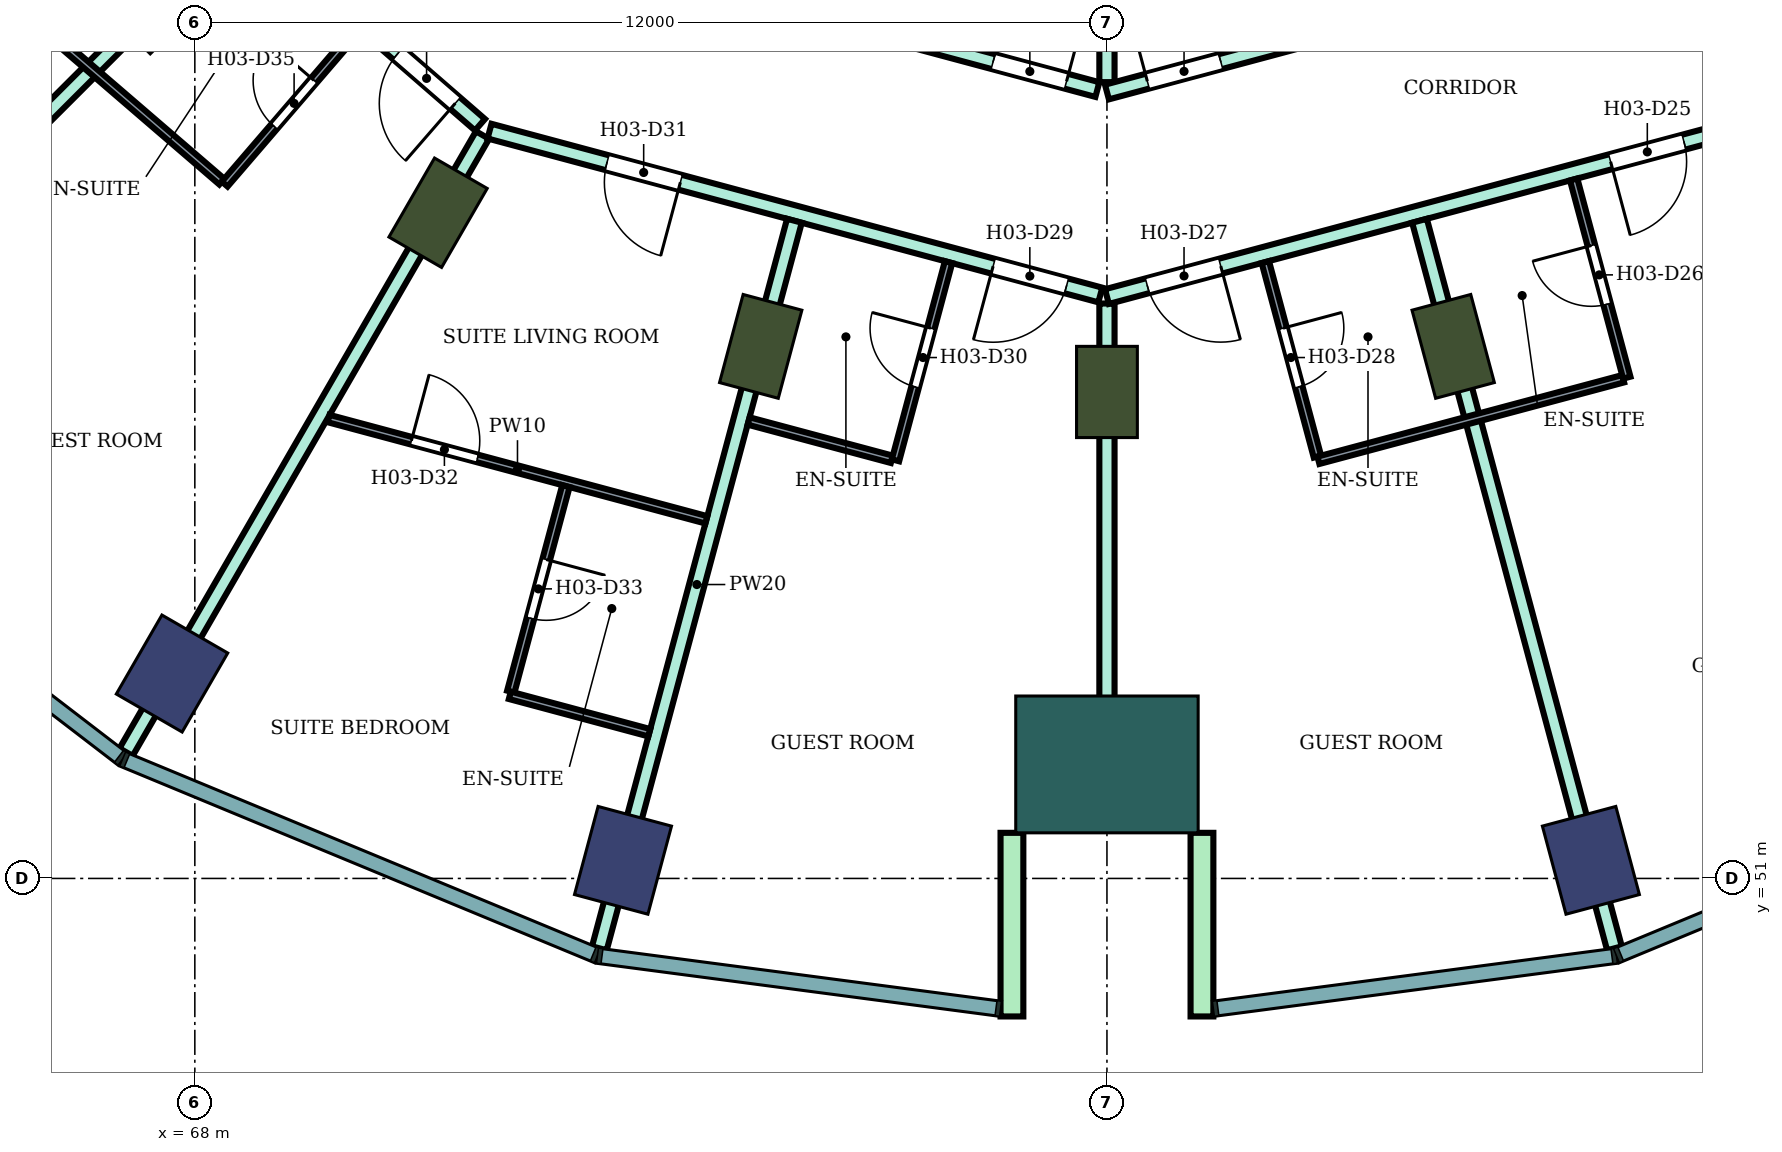
"""IFC4 building model, lengths in metres.
Left out: names, types, materials, properties, quantities, classifications, styles, units other than length and angle.
Written with IfcOpenShell. Run it as: python <this file> out.ifc"""

import sys

from ifc_helpers import new_model, si_unit, direction, frame, frame_2d, origin, origin_2d, place, context, subcontext, project, spatial, rectangle, extrude, element, fill, save


model = new_model("IFC4")
c1 = context("Model", 3, precision=1e-05, world=origin(), true_north=direction((0.0, 1.0)))
c2 = subcontext(c1, "Body", "Model", "MODEL_VIEW")
j1 = project(units=[si_unit("LENGTHUNIT", "METRE"), si_unit("PLANEANGLEUNIT", "RADIAN")], contexts=[c1])
p1 = place(None, origin())
s1 = spatial("IfcSite", under=j1, at=p1, CompositionType="ELEMENT")
p2 = place(p1, origin())
s2 = spatial("IfcBuilding", under=s1, at=p2, CompositionType="ELEMENT")
p3 = place(p2, frame((0.0, 0.0, 55.4)))
s3 = spatial("IfcBuildingStorey", under=s2, at=p3, CompositionType="ELEMENT", Elevation=55.4)
for number, where, z_axis, x_axis in (
    (1, (67.7, 53.696, 0.0), (0.0, 0.0, 1.0), (-0.5, -0.866, 0.0)),
    (2, (73.633, 51.238, 0.0), (0.0, 0.0, 1.0), (-0.259, -0.966, 0.0)),
    (3, (86.367, 51.238, 0.0), (0.0, 0.0, 1.0), (0.259, -0.966, 0.0)),
):
    element("IfcColumn", number, at=place(p3, frame(where, z_axis=z_axis, x_axis=x_axis)), inside=s3, PredefinedType="COLUMN", context=c2, shape_type="SweptSolid", body=[
        extrude(rectangle(XDim=1.2, YDim=1.0, at=origin_2d()), origin(), (0.0, 0.0, 1.0), 3.8),
    ])
for number, where, z_axis, x_axis in (
    (4, (67.555, 62.555, 0.0), (0.0, 0.0, 1.0), (-0.707, -0.707, 0.0)),
    (5, (71.2, 59.758, 0.0), (0.0, 0.0, 1.0), (-0.5, -0.866, 0.0)),
    (6, (75.445, 58.0, 0.0), (0.0, 0.0, 1.0), (-0.259, -0.966, 0.0)),
    (7, (80.0, 57.4, 0.0), (0.0, 0.0, 1.0), (0.0, -1.0, 0.0)),
    (8, (84.555, 58.0, 0.0), (0.0, 0.0, 1.0), (0.259, -0.966, 0.0)),
):
    element("IfcColumn", number, at=place(p3, frame(where, z_axis=z_axis, x_axis=x_axis)), inside=s3, PredefinedType="COLUMN", context=c2, shape_type="SweptSolid", body=[
        extrude(rectangle(XDim=1.2, YDim=0.8, at=origin_2d()), origin(), (0.0, 0.0, 1.0), 3.8),
    ])
p4 = place(p3, frame((80.0, 52.5, 0.0), z_axis=(0.0, 0.0, 1.0), x_axis=(0.0, -1.0, 0.0)))
e9 = element("IfcColumn", 9, at=p4, inside=s3, PredefinedType="COLUMN", context=c2, shape_type="SweptSolid", body=[
    extrude(rectangle(XDim=1.8, YDim=2.4, at=origin_2d()), origin(), (0.0, 0.0, 1.0), 3.8),
])
for number, where, z_axis, x_axis in (
    (10, (78.75, 51.6, 0.0), (0.0, 0.0, 1.0), (0.0, -1.0, 0.0)),
    (11, (81.25, 51.6, 0.0), (0.0, 0.0, 1.0), (0.0, -1.0, 0.0)),
):
    element("IfcWall", number, at=place(p3, frame(where, z_axis=z_axis, x_axis=x_axis)), inside=s3, PredefinedType="NOTDEFINED", context=c2, shape_type="SweptSolid", body=[
        extrude(rectangle(XDim=2.416, YDim=0.3, at=frame_2d((1.208, 0.0))), origin(), (0.0, 0.0, 1.0), 3.8),
    ])
p5 = place(p3, frame((63.596, 58.596, 0.0), z_axis=(0.0, 0.0, 1.0), x_axis=(0.707106781187, 0.707106781187, 0.0)))
e12 = element("IfcWall", 12, at=p5, inside=s3, PredefinedType="PARTITIONING", context=c2, shape_type="SweptSolid", body=[
    extrude(rectangle(XDim=7.005, YDim=0.2, at=frame_2d((3.503, 0.0))), origin(), (0.0, 0.0, 1.0), 3.35),
])
p6 = place(p3, frame((67.081, 64.971, 0.0), z_axis=(0.0, 0.0, 1.0), x_axis=(0.755031061605, -0.65568902386, 0.0)))
e13 = element("IfcWall", 13, at=p6, inside=s3, PredefinedType="PARTITIONING", context=c2, shape_type="SweptSolid", body=[
    extrude(rectangle(XDim=6.186, YDim=0.2, at=frame_2d((3.093, 0.0))), origin(), (0.0, 0.0, 1.0), 3.35),
])
p7 = place(p6, frame((4.755, 0.0, 0.0)))
e14 = element("IfcOpeningElement", 14, at=p7, cuts=e13, PredefinedType="OPENING", context=c2, shape_type="SweptSolid", body=[
    extrude(rectangle(XDim=1.0, YDim=2.1, at=frame_2d((0.5, 1.05))), frame((0.0, 0.11, 0.0), z_axis=(0.0, -1.0, 0.0), x_axis=(1.0, 0.0, 0.0)), (0.0, 0.0, 1.0), 0.22),
])
p8 = place(p3, frame((67.095, 52.662, 0.0), z_axis=(0.0, 0.0, 1.0), x_axis=(0.500247659952, 0.865882370021, 0.0)))
e15 = element("IfcWall", 15, at=p8, inside=s3, PredefinedType="PARTITIONING", context=c2, shape_type="SweptSolid", body=[
    extrude(rectangle(XDim=9.375, YDim=0.2, at=frame_2d((4.688, 0.0))), origin(), (0.0, 0.0, 1.0), 3.35),
])
p9 = place(p3, frame((71.877, 60.831, 0.0), z_axis=(0.0, 0.0, 1.0), x_axis=(0.965852509869, -0.259092510851, 0.0)))
e16 = element("IfcWall", 16, at=p9, inside=s3, PredefinedType="PARTITIONING", context=c2, shape_type="SweptSolid", body=[
    extrude(rectangle(XDim=8.32, YDim=0.2, at=frame_2d((4.16, 0.0))), origin(), (0.0, 0.0, 1.0), 3.35),
])
p10 = place(p9, frame((6.86, 0.0, 0.0)))
e17 = element("IfcOpeningElement", 17, at=p10, cuts=e16, PredefinedType="OPENING", context=c2, shape_type="SweptSolid", body=[
    extrude(rectangle(XDim=1.0, YDim=2.1, at=frame_2d((0.5, 1.05))), frame((0.0, 0.11, 0.0), z_axis=(0.0, -1.0, 0.0), x_axis=(1.0, 0.0, 0.0)), (0.0, 0.0, 1.0), 0.22),
])
p11 = place(p9, frame((1.6, 0.0, 0.0)))
e18 = element("IfcOpeningElement", 18, at=p11, cuts=e16, PredefinedType="OPENING", context=c2, shape_type="SweptSolid", body=[
    extrude(rectangle(XDim=1.0, YDim=2.1, at=frame_2d((0.5, 1.05))), frame((0.0, 0.11, 0.0), z_axis=(0.0, -1.0, 0.0), x_axis=(1.0, 0.0, 0.0)), (0.0, 0.0, 1.0), 0.22),
])
p12 = place(p3, frame((73.297, 63.143, 0.0), z_axis=(0.0, 0.0, 1.0), x_axis=(0.965859030528, -0.25906820173, 0.0)))
e19 = element("IfcWall", 19, at=p12, inside=s3, PredefinedType="PARTITIONING", context=c2, shape_type="SweptSolid", body=[
    extrude(rectangle(XDim=6.81, YDim=0.2, at=frame_2d((3.405, 0.0))), origin(), (0.0, 0.0, 1.0), 3.35),
])
p13 = place(p12, frame((5.39, 0.0, 0.0)))
e20 = element("IfcOpeningElement", 20, at=p13, cuts=e19, PredefinedType="OPENING", context=c2, shape_type="SweptSolid", body=[
    extrude(rectangle(XDim=1.0, YDim=2.1, at=frame_2d((0.5, 1.05))), frame((0.0, 0.11, 0.0), z_axis=(0.0, -1.0, 0.0), x_axis=(1.0, 0.0, 0.0)), (0.0, 0.0, 1.0), 0.22),
])
p14 = place(p3, frame((73.322, 50.081, 0.0), z_axis=(0.0, 0.0, 1.0), x_axis=(0.25896431718, 0.965886889044, 0.0)))
e21 = element("IfcWall", 21, at=p14, inside=s3, PredefinedType="PARTITIONING", context=c2, shape_type="SweptSolid", body=[
    extrude(rectangle(XDim=9.909, YDim=0.2, at=frame_2d((4.955, 0.0))), origin(), (0.0, 0.0, 1.0), 3.35),
])
p15 = place(p3, frame((80.0, 51.8, 0.0), z_axis=(0.0, 0.0, 1.0), x_axis=(0.0, 1.0, 0.0)))
e22 = element("IfcWall", 22, at=p15, inside=s3, PredefinedType="PARTITIONING", context=c2, shape_type="SweptSolid", body=[
    extrude(rectangle(XDim=6.764, YDim=0.2, at=frame_2d((3.382, 0.0))), origin(), (0.0, 0.0, 1.0), 3.35),
])
p16 = place(p3, frame((80.0, 58.655, 0.0), z_axis=(0.0, 0.0, 1.0), x_axis=(0.965974635626, 0.258636817424, 0.0)))
e23 = element("IfcWall", 23, at=p16, inside=s3, PredefinedType="PARTITIONING", context=c2, shape_type="SweptSolid", body=[
    extrude(rectangle(XDim=8.36, YDim=0.2, at=frame_2d((4.18, 0.0))), origin(), (0.0, 0.0, 1.0), 3.35),
])
p17 = place(p16, frame((6.86, 0.0, 0.0)))
e24 = element("IfcOpeningElement", 24, at=p17, cuts=e23, PredefinedType="OPENING", context=c2, shape_type="SweptSolid", body=[
    extrude(rectangle(XDim=1.0, YDim=2.1, at=frame_2d((0.5, 1.05))), frame((0.0, 0.11, 0.0), z_axis=(0.0, -1.0, 0.0), x_axis=(1.0, 0.0, 0.0)), (0.0, 0.0, 1.0), 0.22),
])
p18 = place(p16, frame((0.55, 0.0, 0.0)))
e25 = element("IfcOpeningElement", 25, at=p18, cuts=e23, PredefinedType="OPENING", context=c2, shape_type="SweptSolid", body=[
    extrude(rectangle(XDim=1.0, YDim=2.1, at=frame_2d((0.5, 1.05))), frame((0.0, 0.11, 0.0), z_axis=(0.0, -1.0, 0.0), x_axis=(1.0, 0.0, 0.0)), (0.0, 0.0, 1.0), 0.22),
])
p19 = place(p3, frame((80.0, 61.476, 0.0), z_axis=(0.0, 0.0, 1.0), x_axis=(0.0, 1.0, 0.0)))
e26 = element("IfcWall", 26, at=p19, inside=s3, PredefinedType="PARTITIONING", context=c2, shape_type="SweptSolid", body=[
    extrude(rectangle(XDim=5.825, YDim=0.2, at=frame_2d((2.913, 0.0))), origin(), (0.0, 0.0, 1.0), 3.35),
])
p20 = place(p3, frame((80.0, 61.346, 0.0), z_axis=(0.0, 0.0, 1.0), x_axis=(0.965924181808, 0.258825182312, 0.0)))
e27 = element("IfcWall", 27, at=p20, inside=s3, PredefinedType="PARTITIONING", context=c2, shape_type="SweptSolid", body=[
    extrude(rectangle(XDim=6.94, YDim=0.2, at=frame_2d((3.47, 0.0))), origin(), (0.0, 0.0, 1.0), 3.35),
])
p21 = place(p20, frame((0.55, 0.0, 0.0)))
e28 = element("IfcOpeningElement", 28, at=p21, cuts=e27, PredefinedType="OPENING", context=c2, shape_type="SweptSolid", body=[
    extrude(rectangle(XDim=1.0, YDim=2.1, at=frame_2d((0.5, 1.05))), frame((0.0, 0.11, 0.0), z_axis=(0.0, -1.0, 0.0), x_axis=(1.0, 0.0, 0.0)), (0.0, 0.0, 1.0), 0.22),
])
p22 = place(p3, frame((84.112, 59.652, 0.0), z_axis=(0.0, 0.0, 1.0), x_axis=(0.258843225553, -0.965919346832, 0.0)))
e29 = element("IfcWall", 29, at=p22, inside=s3, PredefinedType="PARTITIONING", context=c2, shape_type="SweptSolid", body=[
    extrude(rectangle(XDim=9.909, YDim=0.2, at=frame_2d((4.955, 0.0))), origin(), (0.0, 0.0, 1.0), 3.35),
])
p23 = place(p3, frame((65.209, 62.875, 0.0), z_axis=(0.0, 0.0, 1.0), x_axis=(0.757930378138, -0.652335451969, 0.0)))
e30 = element("IfcWall", 30, at=p23, inside=s3, PredefinedType="PARTITIONING", context=c2, shape_type="SweptSolid", body=[
    extrude(rectangle(XDim=4.15, YDim=0.1, at=frame_2d((2.075, 0.0))), origin(), (0.0, 0.0, 1.0), 3.35),
])
p24 = place(p3, frame((68.393, 60.135, 0.0), z_axis=(0.0, 0.0, 1.0), x_axis=(0.652061182569, 0.758166349944, 0.0)))
e31 = element("IfcWall", 31, at=p24, inside=s3, PredefinedType="PARTITIONING", context=c2, shape_type="SweptSolid", body=[
    extrude(rectangle(XDim=2.69, YDim=0.1, at=frame_2d((1.345, 0.0))), origin(), (0.0, 0.0, 1.0), 3.35),
])
p25 = place(p24, frame((1.0, 0.0, 0.0)))
e32 = element("IfcOpeningElement", 32, at=p25, cuts=e31, PredefinedType="OPENING", context=c2, shape_type="SweptSolid", body=[
    extrude(rectangle(XDim=0.8, YDim=2.1, at=frame_2d((0.4, 1.05))), frame((0.0, 0.06, 0.0), z_axis=(0.0, -1.0, 0.0), x_axis=(1.0, 0.0, 0.0)), (0.0, 0.0, 1.0), 0.12),
])
p26 = place(p3, frame((69.76, 57.051, 0.0), z_axis=(0.0, 0.0, 1.0), x_axis=(0.965880475586, -0.258988236958, 0.0)))
e33 = element("IfcWall", 33, at=p26, inside=s3, PredefinedType="PARTITIONING", context=c2, shape_type="SweptSolid", body=[
    extrude(rectangle(XDim=5.146, YDim=0.1, at=frame_2d((2.573, 0.0))), origin(), (0.0, 0.0, 1.0), 3.35),
])
p27 = place(p26, frame((1.128, 0.0, 0.0)))
e34 = element("IfcOpeningElement", 34, at=p27, cuts=e33, PredefinedType="OPENING", context=c2, shape_type="SweptSolid", body=[
    extrude(rectangle(XDim=0.9, YDim=2.1, at=frame_2d((0.45, 1.05))), frame((0.0, 0.06, 0.0), z_axis=(0.0, -1.0, 0.0), x_axis=(1.0, 0.0, 0.0)), (0.0, 0.0, 1.0), 0.12),
])
p28 = place(p3, frame((72.157, 53.457, 0.0), z_axis=(0.0, 0.0, 1.0), x_axis=(0.258975798317, 0.965883810759, 0.0)))
e35 = element("IfcWall", 35, at=p28, inside=s3, PredefinedType="PARTITIONING", context=c2, shape_type="SweptSolid", body=[
    extrude(rectangle(XDim=2.8, YDim=0.1, at=frame_2d((1.4, 0.0))), origin(), (0.0, 0.0, 1.0), 3.35),
])
p29 = place(p28, frame((1.0, 0.0, 0.0)))
e36 = element("IfcOpeningElement", 36, at=p29, cuts=e35, PredefinedType="OPENING", context=c2, shape_type="SweptSolid", body=[
    extrude(rectangle(XDim=0.8, YDim=2.1, at=frame_2d((0.4, 1.05))), frame((0.0, 0.06, 0.0), z_axis=(0.0, -1.0, 0.0), x_axis=(1.0, 0.0, 0.0)), (0.0, 0.0, 1.0), 0.12),
])
p30 = place(p3, frame((72.144, 53.409, 0.0), z_axis=(0.0, 0.0, 1.0), x_axis=(0.965907902023, -0.258885930111, 0.0)))
e37 = element("IfcWall", 37, at=p30, inside=s3, PredefinedType="PARTITIONING", context=c2, shape_type="SweptSolid", body=[
    extrude(rectangle(XDim=1.9, YDim=0.1, at=frame_2d((0.95, 0.0))), origin(), (0.0, 0.0, 1.0), 3.35),
])
p31 = place(p3, frame((75.286, 57.018, 0.0), z_axis=(0.0, 0.0, 1.0), x_axis=(0.966003902934, -0.258527483095, 0.0)))
e38 = element("IfcWall", 38, at=p31, inside=s3, PredefinedType="PARTITIONING", context=c2, shape_type="SweptSolid", body=[
    extrude(rectangle(XDim=1.95, YDim=0.1, at=frame_2d((0.975, 0.0))), origin(), (0.0, 0.0, 1.0), 3.35),
])
p32 = place(p3, frame((77.218, 56.501, 0.0), z_axis=(0.0, 0.0, 1.0), x_axis=(0.258591408257, 0.965986792651, 0.0)))
e39 = element("IfcWall", 39, at=p32, inside=s3, PredefinedType="PARTITIONING", context=c2, shape_type="SweptSolid", body=[
    extrude(rectangle(XDim=2.699, YDim=0.1, at=frame_2d((1.35, 0.0))), origin(), (0.0, 0.0, 1.0), 3.35),
])
p33 = place(p32, frame((1.0, 0.0, 0.0)))
e40 = element("IfcOpeningElement", 40, at=p33, cuts=e39, PredefinedType="OPENING", context=c2, shape_type="SweptSolid", body=[
    extrude(rectangle(XDim=0.8, YDim=2.1, at=frame_2d((0.4, 1.05))), frame((0.0, 0.06, 0.0), z_axis=(0.0, -1.0, 0.0), x_axis=(1.0, 0.0, 0.0)), (0.0, 0.0, 1.0), 0.12),
])
p34 = place(p3, frame((82.084, 59.108, 0.0), z_axis=(0.0, 0.0, 1.0), x_axis=(0.258591746437, -0.965986702121, 0.0)))
e41 = element("IfcWall", 41, at=p34, inside=s3, PredefinedType="PARTITIONING", context=c2, shape_type="SweptSolid", body=[
    extrude(rectangle(XDim=2.649, YDim=0.1, at=frame_2d((1.325, 0.0))), origin(), (0.0, 0.0, 1.0), 3.35),
])
p35 = place(p34, frame((0.9, 0.0, 0.0)))
e42 = element("IfcOpeningElement", 42, at=p35, cuts=e41, PredefinedType="OPENING", context=c2, shape_type="SweptSolid", body=[
    extrude(rectangle(XDim=0.8, YDim=2.1, at=frame_2d((0.4, 1.05))), frame((0.0, 0.06, 0.0), z_axis=(0.0, -1.0, 0.0), x_axis=(1.0, 0.0, 0.0)), (0.0, 0.0, 1.0), 0.12),
])
p36 = place(p3, frame((82.782, 56.501, 0.0), z_axis=(0.0, 0.0, 1.0), x_axis=(0.965999228418, 0.258544949083, 0.0)))
e43 = element("IfcWall", 43, at=p36, inside=s3, PredefinedType="PARTITIONING", context=c2, shape_type="SweptSolid", body=[
    extrude(rectangle(XDim=4.15, YDim=0.1, at=frame_2d((2.075, 0.0))), origin(), (0.0, 0.0, 1.0), 3.35),
])
p37 = place(p3, frame((86.14, 60.196, 0.0), z_axis=(0.0, 0.0, 1.0), x_axis=(0.258945475746, -0.965891940432, 0.0)))
e44 = element("IfcWall", 44, at=p37, inside=s3, PredefinedType="PARTITIONING", context=c2, shape_type="SweptSolid", body=[
    extrude(rectangle(XDim=2.7, YDim=0.1, at=frame_2d((1.35, 0.0))), origin(), (0.0, 0.0, 1.0), 3.35),
])
p38 = place(p37, frame((0.9, 0.0, 0.0)))
e45 = element("IfcOpeningElement", 45, at=p38, cuts=e44, PredefinedType="OPENING", context=c2, shape_type="SweptSolid", body=[
    extrude(rectangle(XDim=0.8, YDim=2.1, at=frame_2d((0.4, 1.05))), frame((0.0, 0.06, 0.0), z_axis=(0.0, -1.0, 0.0), x_axis=(1.0, 0.0, 0.0)), (0.0, 0.0, 1.0), 0.12),
])
p39 = place(p17, frame((1.0, 0.0, 0.0), z_axis=(0.0, 0.0, 1.0), x_axis=(-1.0, 0.0, 0.0)))
e46 = element("IfcDoor", 46, at=p39, inside=s3, OperationType="SINGLE_SWING_RIGHT", PredefinedType="DOOR", context=c2, shape_type="SweptSolid", body=[
    extrude(rectangle(XDim=1.0, YDim=2.1, at=frame_2d((0.5, 1.05))), frame((0.0, 0.025, 0.0), z_axis=(0.0, -1.0, 0.0), x_axis=(1.0, 0.0, 0.0)), (0.0, 0.0, 1.0), 0.05),
])
fill(e24, e46)
p40 = place(p38, frame((0.8, 0.0, 0.0), z_axis=(0.0, 0.0, 1.0), x_axis=(-1.0, 0.0, 0.0)))
e47 = element("IfcDoor", 47, at=p40, inside=s3, OperationType="SINGLE_SWING_RIGHT", PredefinedType="DOOR", context=c2, shape_type="SweptSolid", body=[
    extrude(rectangle(XDim=0.8, YDim=2.1, at=frame_2d((0.4, 1.05))), frame((0.0, 0.025, 0.0), z_axis=(0.0, -1.0, 0.0), x_axis=(1.0, 0.0, 0.0)), (0.0, 0.0, 1.0), 0.05),
])
fill(e45, e47)
p41 = place(p18, frame((1.0, 0.0, 0.0), z_axis=(0.0, 0.0, 1.0), x_axis=(-1.0, 0.0, 0.0)))
e48 = element("IfcDoor", 48, at=p41, inside=s3, OperationType="SINGLE_SWING_LEFT", PredefinedType="DOOR", context=c2, shape_type="SweptSolid", body=[
    extrude(rectangle(XDim=1.0, YDim=2.1, at=frame_2d((0.5, 1.05))), frame((0.0, 0.025, 0.0), z_axis=(0.0, -1.0, 0.0), x_axis=(1.0, 0.0, 0.0)), (0.0, 0.0, 1.0), 0.05),
])
fill(e25, e48)
p42 = place(p35, origin())
e49 = element("IfcDoor", 49, at=p42, inside=s3, OperationType="SINGLE_SWING_LEFT", PredefinedType="DOOR", context=c2, shape_type="SweptSolid", body=[
    extrude(rectangle(XDim=0.8, YDim=2.1, at=frame_2d((0.4, 1.05))), frame((0.0, 0.025, 0.0), z_axis=(0.0, -1.0, 0.0), x_axis=(1.0, 0.0, 0.0)), (0.0, 0.0, 1.0), 0.05),
])
fill(e42, e49)
p43 = place(p10, frame((1.0, 0.0, 0.0), z_axis=(0.0, 0.0, 1.0), x_axis=(-1.0, 0.0, 0.0)))
e50 = element("IfcDoor", 50, at=p43, inside=s3, OperationType="SINGLE_SWING_RIGHT", PredefinedType="DOOR", context=c2, shape_type="SweptSolid", body=[
    extrude(rectangle(XDim=1.0, YDim=2.1, at=frame_2d((0.5, 1.05))), frame((0.0, 0.025, 0.0), z_axis=(0.0, -1.0, 0.0), x_axis=(1.0, 0.0, 0.0)), (0.0, 0.0, 1.0), 0.05),
])
fill(e17, e50)
p44 = place(p33, origin())
e51 = element("IfcDoor", 51, at=p44, inside=s3, OperationType="SINGLE_SWING_RIGHT", PredefinedType="DOOR", context=c2, shape_type="SweptSolid", body=[
    extrude(rectangle(XDim=0.8, YDim=2.1, at=frame_2d((0.4, 1.05))), frame((0.0, 0.025, 0.0), z_axis=(0.0, -1.0, 0.0), x_axis=(1.0, 0.0, 0.0)), (0.0, 0.0, 1.0), 0.05),
])
fill(e40, e51)
p45 = place(p11, frame((1.0, 0.0, 0.0), z_axis=(0.0, 0.0, 1.0), x_axis=(-1.0, 0.0, 0.0)))
e52 = element("IfcDoor", 52, at=p45, inside=s3, OperationType="SINGLE_SWING_LEFT", PredefinedType="DOOR", context=c2, shape_type="SweptSolid", body=[
    extrude(rectangle(XDim=1.0, YDim=2.1, at=frame_2d((0.5, 1.05))), frame((0.0, 0.025, 0.0), z_axis=(0.0, -1.0, 0.0), x_axis=(1.0, 0.0, 0.0)), (0.0, 0.0, 1.0), 0.05),
])
fill(e18, e52)
p46 = place(p27, origin())
e53 = element("IfcDoor", 53, at=p46, inside=s3, OperationType="SINGLE_SWING_LEFT", PredefinedType="DOOR", context=c2, shape_type="SweptSolid", body=[
    extrude(rectangle(XDim=0.9, YDim=2.1, at=frame_2d((0.45, 1.05))), frame((0.0, 0.025, 0.0), z_axis=(0.0, -1.0, 0.0), x_axis=(1.0, 0.0, 0.0)), (0.0, 0.0, 1.0), 0.05),
])
fill(e34, e53)
p47 = place(p29, frame((0.8, 0.0, 0.0), z_axis=(0.0, 0.0, 1.0), x_axis=(-1.0, 0.0, 0.0)))
e54 = element("IfcDoor", 54, at=p47, inside=s3, OperationType="SINGLE_SWING_LEFT", PredefinedType="DOOR", context=c2, shape_type="SweptSolid", body=[
    extrude(rectangle(XDim=0.8, YDim=2.1, at=frame_2d((0.4, 1.05))), frame((0.0, 0.025, 0.0), z_axis=(0.0, -1.0, 0.0), x_axis=(1.0, 0.0, 0.0)), (0.0, 0.0, 1.0), 0.05),
])
fill(e36, e54)
p48 = place(p7, frame((1.0, 0.0, 0.0), z_axis=(0.0, 0.0, 1.0), x_axis=(-1.0, 0.0, 0.0)))
e55 = element("IfcDoor", 55, at=p48, inside=s3, OperationType="SINGLE_SWING_LEFT", PredefinedType="DOOR", context=c2, shape_type="SweptSolid", body=[
    extrude(rectangle(XDim=1.0, YDim=2.1, at=frame_2d((0.5, 1.05))), frame((0.0, 0.025, 0.0), z_axis=(0.0, -1.0, 0.0), x_axis=(1.0, 0.0, 0.0)), (0.0, 0.0, 1.0), 0.05),
])
fill(e14, e55)
p49 = place(p25, origin())
e56 = element("IfcDoor", 56, at=p49, inside=s3, OperationType="SINGLE_SWING_RIGHT", PredefinedType="DOOR", context=c2, shape_type="SweptSolid", body=[
    extrude(rectangle(XDim=0.8, YDim=2.1, at=frame_2d((0.4, 1.05))), frame((0.0, 0.025, 0.0), z_axis=(0.0, -1.0, 0.0), x_axis=(1.0, 0.0, 0.0)), (0.0, 0.0, 1.0), 0.05),
])
fill(e32, e56)
p50 = place(p21, origin())
e57 = element("IfcDoor", 57, at=p50, inside=s3, OperationType="SINGLE_SWING_LEFT", PredefinedType="DOOR", context=c2, shape_type="SweptSolid", body=[
    extrude(rectangle(XDim=1.0, YDim=2.1, at=frame_2d((0.5, 1.05))), frame((0.0, 0.025, 0.0), z_axis=(0.0, -1.0, 0.0), x_axis=(1.0, 0.0, 0.0)), (0.0, 0.0, 1.0), 0.05),
])
fill(e28, e57)
p51 = place(p13, origin())
e58 = element("IfcDoor", 58, at=p51, inside=s3, OperationType="SINGLE_SWING_RIGHT", PredefinedType="DOOR", context=c2, shape_type="SweptSolid", body=[
    extrude(rectangle(XDim=1.0, YDim=2.1, at=frame_2d((0.5, 1.05))), frame((0.0, 0.025, 0.0), z_axis=(0.0, -1.0, 0.0), x_axis=(1.0, 0.0, 0.0)), (0.0, 0.0, 1.0), 0.05),
])
fill(e20, e58)
save(model, sys.argv[1])
